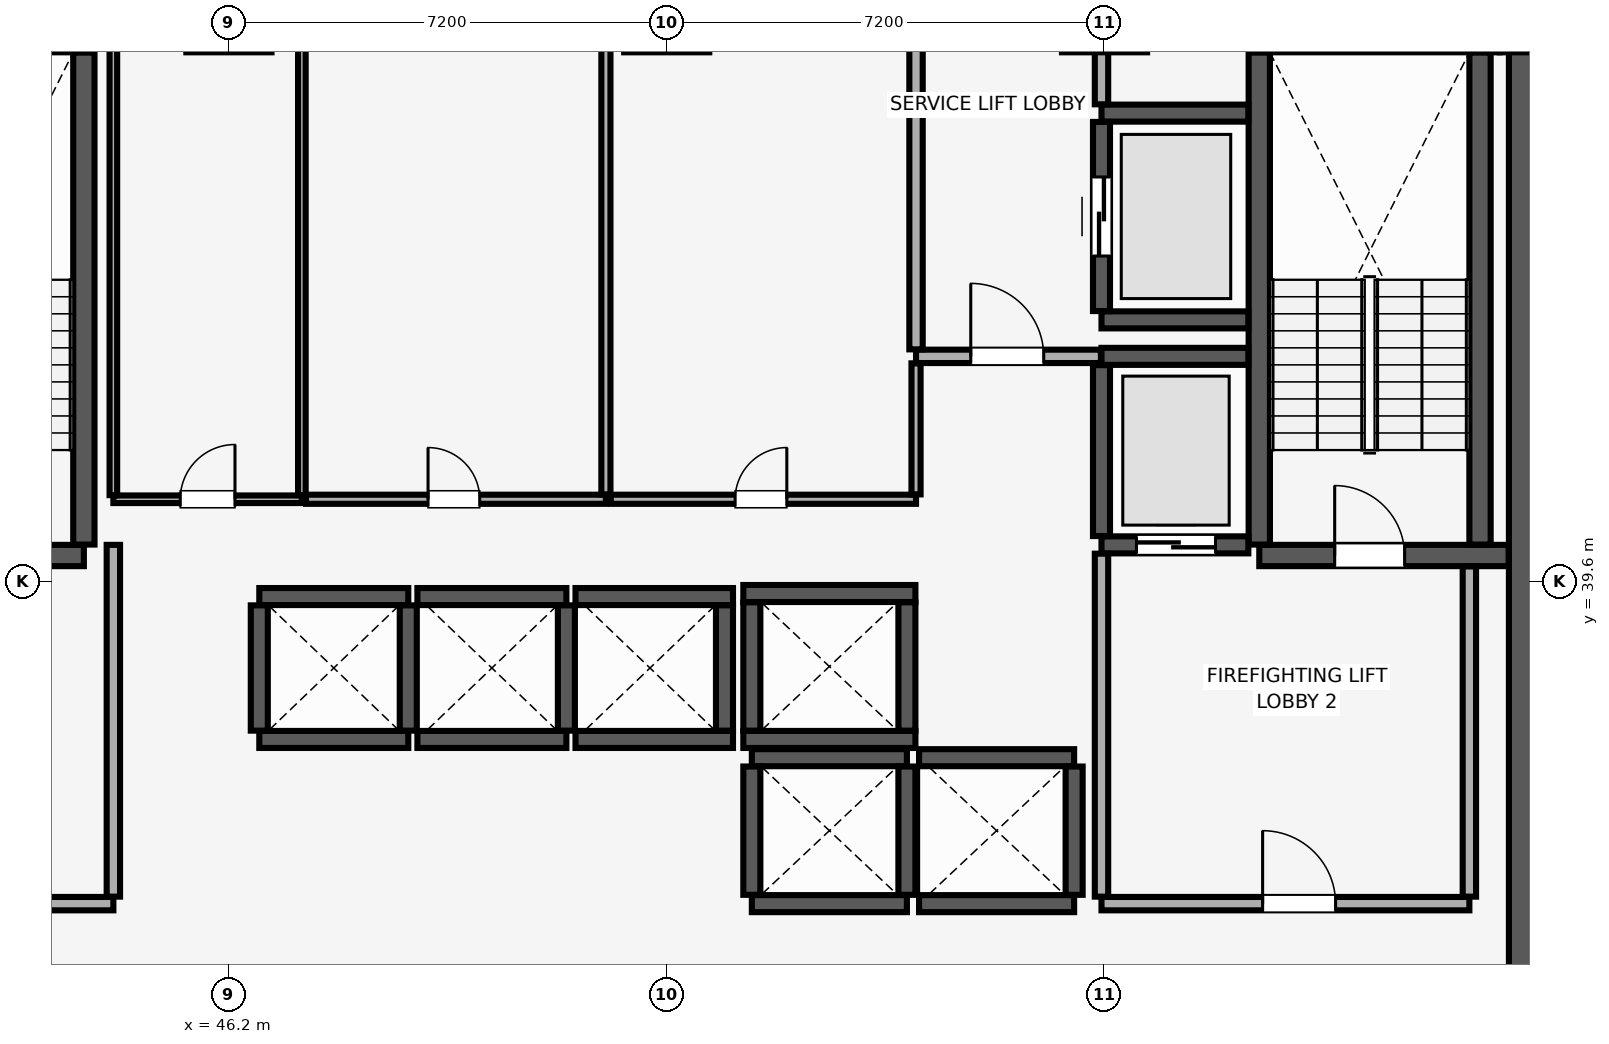
"""IFC4 building model, lengths in metres.
Left out: names, types, materials, properties, quantities, classifications, styles, units other than length and angle.
Written with IfcOpenShell. Run it as: python <this file> out.ifc"""

import sys

from ifc_helpers import new_model, si_unit, direction, frame, frame_2d, origin, place, context, subcontext, project, spatial, rectangle, extrude, element, fill, save


model = new_model("IFC4")
c1 = context("Model", 3, precision=1e-05, world=origin(), true_north=direction((0.0, 1.0)))
c2 = subcontext(c1, "Body", "Model", "MODEL_VIEW")
j1 = project(units=[si_unit("LENGTHUNIT", "METRE"), si_unit("PLANEANGLEUNIT", "RADIAN")], contexts=[c1])
p1 = place(None, origin())
s1 = spatial("IfcSite", under=j1, at=p1, CompositionType="ELEMENT")
p2 = place(p1, origin())
s2 = spatial("IfcBuilding", under=s1, at=p2, CompositionType="ELEMENT")
p3 = place(p2, frame((0.0, 0.0, 31.4)))
s3 = spatial("IfcBuildingStorey", under=s2, at=p3, CompositionType="ELEMENT", Elevation=31.4)
p4 = place(p3, frame((67.8, 29.4, 0.0), z_axis=(0.0, 0.0, 1.0), x_axis=(0.0, 1.0, 0.0)))
e1 = element("IfcWall", 1, at=p4, inside=s3, PredefinedType="SHEAR", context=c2, shape_type="SweptSolid", body=[
    extrude(rectangle(XDim=19.2, YDim=1.1, at=frame_2d((9.6, 0.0))), origin(), (0.0, 0.0, 1.0), 3.51),
])
p5 = place(p3, frame((40.185, 40.025, 0.0), z_axis=(0.0, 0.0, 1.0), x_axis=(1.0, 0.0, 0.0)))
e2 = element("IfcWall", 2, at=p5, inside=s3, PredefinedType="SHEAR", context=c2, shape_type="SweptSolid", body=[
    extrude(rectangle(XDim=3.63, YDim=0.35, at=frame_2d((1.815, 0.0))), origin(), (0.0, 0.0, 1.0), 3.51),
])
p6 = place(p5, frame((1.24, 0.0, 0.0)))
e3 = element("IfcOpeningElement", 3, at=p6, cuts=e2, PredefinedType="OPENING", context=c2, shape_type="SweptSolid", body=[
    extrude(rectangle(XDim=1.15, YDim=2.15, at=frame_2d((0.575, 1.075))), frame((0.0, 0.185, 0.0), z_axis=(0.0, -1.0, 0.0), x_axis=(1.0, 0.0, 0.0)), (0.0, 0.0, 1.0), 0.37),
])
p7 = place(p3, frame((43.815, 40.205, 0.0), z_axis=(0.0, 0.0, 1.0), x_axis=(0.0, 1.0, 0.0)))
e4 = element("IfcWall", 4, at=p7, inside=s3, PredefinedType="SHEAR", context=c2, shape_type="SweptSolid", body=[
    extrude(rectangle(XDim=8.09, YDim=0.35, at=frame_2d((4.045, 0.0))), origin(), (0.0, 0.0, 1.0), 3.51),
])
p8 = place(p3, frame((63.145, 40.025, 0.0), z_axis=(0.0, 0.0, 1.0), x_axis=(1.0, 0.0, 0.0)))
e5 = element("IfcWall", 5, at=p8, inside=s3, PredefinedType="SHEAR", context=c2, shape_type="SweptSolid", body=[
    extrude(rectangle(XDim=4.1, YDim=0.35, at=frame_2d((2.05, 0.0))), origin(), (0.0, 0.0, 1.0), 3.51),
])
p9 = place(p8, frame((1.24, 0.0, 0.0)))
e6 = element("IfcOpeningElement", 6, at=p9, cuts=e5, PredefinedType="OPENING", context=c2, shape_type="SweptSolid", body=[
    extrude(rectangle(XDim=1.15, YDim=2.15, at=frame_2d((0.575, 1.075))), frame((0.0, 0.185, 0.0), z_axis=(0.0, -1.0, 0.0), x_axis=(1.0, 0.0, 0.0)), (0.0, 0.0, 1.0), 0.37),
])
for number, where, z_axis, x_axis in (
    (7, (63.145, 40.205, 0.0), (0.0, 0.0, 1.0), (0.0, 1.0, 0.0)),
    (8, (66.775, 40.205, 0.0), (0.0, 0.0, 1.0), (0.0, 1.0, 0.0)),
):
    element("IfcWall", number, at=place(p3, frame(where, z_axis=z_axis, x_axis=x_axis)), inside=s3, PredefinedType="SHEAR", context=c2, shape_type="SweptSolid", body=[
        extrude(rectangle(XDim=8.09, YDim=0.35, at=frame_2d((4.045, 0.0))), origin(), (0.0, 0.0, 1.0), 3.51),
    ])
for number, where, z_axis, x_axis in (
    (9, (46.7, 37.0, 0.0), (0.0, 0.0, 1.0), (1.0, 0.0, 0.0)),
    (10, (46.7, 39.35, 0.0), (0.0, 0.0, 1.0), (1.0, 0.0, 0.0)),
):
    element("IfcWall", number, at=place(p3, frame(where, z_axis=z_axis, x_axis=x_axis)), inside=s3, PredefinedType="SHEAR", context=c2, shape_type="SweptSolid", body=[
        extrude(rectangle(XDim=2.45, YDim=0.28, at=frame_2d((1.225, 0.0))), origin(), (0.0, 0.0, 1.0), 3.51),
    ])
for number, where, z_axis, x_axis in (
    (11, (46.7, 37.145, 0.0), (0.0, 0.0, 1.0), (0.0, 1.0, 0.0)),
    (12, (49.15, 37.145, 0.0), (0.0, 0.0, 1.0), (0.0, 1.0, 0.0)),
):
    element("IfcWall", number, at=place(p3, frame(where, z_axis=z_axis, x_axis=x_axis)), inside=s3, PredefinedType="SHEAR", context=c2, shape_type="SweptSolid", body=[
        extrude(rectangle(XDim=2.06, YDim=0.28, at=frame_2d((1.03, 0.0))), origin(), (0.0, 0.0, 1.0), 3.51),
    ])
for number, where, z_axis, x_axis in (
    (13, (49.3, 37.0, 0.0), (0.0, 0.0, 1.0), (1.0, 0.0, 0.0)),
    (14, (49.3, 39.35, 0.0), (0.0, 0.0, 1.0), (1.0, 0.0, 0.0)),
):
    element("IfcWall", number, at=place(p3, frame(where, z_axis=z_axis, x_axis=x_axis)), inside=s3, PredefinedType="SHEAR", context=c2, shape_type="SweptSolid", body=[
        extrude(rectangle(XDim=2.45, YDim=0.28, at=frame_2d((1.225, 0.0))), origin(), (0.0, 0.0, 1.0), 3.51),
    ])
p10 = place(p3, frame((51.75, 37.145, 0.0), z_axis=(0.0, 0.0, 1.0), x_axis=(0.0, 1.0, 0.0)))
e15 = element("IfcWall", 15, at=p10, inside=s3, PredefinedType="SHEAR", context=c2, shape_type="SweptSolid", body=[
    extrude(rectangle(XDim=2.06, YDim=0.28, at=frame_2d((1.03, 0.0))), origin(), (0.0, 0.0, 1.0), 3.51),
])
for number, where, z_axis, x_axis in (
    (16, (51.9, 37.0, 0.0), (0.0, 0.0, 1.0), (1.0, 0.0, 0.0)),
    (17, (51.9, 39.35, 0.0), (0.0, 0.0, 1.0), (1.0, 0.0, 0.0)),
):
    element("IfcWall", number, at=place(p3, frame(where, z_axis=z_axis, x_axis=x_axis)), inside=s3, PredefinedType="SHEAR", context=c2, shape_type="SweptSolid", body=[
        extrude(rectangle(XDim=2.59, YDim=0.28, at=frame_2d((1.295, 0.0))), origin(), (0.0, 0.0, 1.0), 3.51),
    ])
p11 = place(p3, frame((54.35, 37.145, 0.0), z_axis=(0.0, 0.0, 1.0), x_axis=(0.0, 1.0, 0.0)))
e18 = element("IfcWall", 18, at=p11, inside=s3, PredefinedType="SHEAR", context=c2, shape_type="SweptSolid", body=[
    extrude(rectangle(XDim=2.06, YDim=0.28, at=frame_2d((1.03, 0.0))), origin(), (0.0, 0.0, 1.0), 3.51),
])
for number, where, z_axis, x_axis in (
    (19, (54.8, 34.3, 0.0), (0.0, 0.0, 1.0), (1.0, 0.0, 0.0)),
    (20, (54.8, 36.7, 0.0), (0.0, 0.0, 1.0), (1.0, 0.0, 0.0)),
):
    element("IfcWall", number, at=place(p3, frame(where, z_axis=z_axis, x_axis=x_axis)), inside=s3, PredefinedType="SHEAR", context=c2, shape_type="SweptSolid", body=[
        extrude(rectangle(XDim=2.55, YDim=0.28, at=frame_2d((1.275, 0.0))), origin(), (0.0, 0.0, 1.0), 3.51),
    ])
for number, where, z_axis, x_axis in (
    (21, (54.8, 34.445, 0.0), (0.0, 0.0, 1.0), (0.0, 1.0, 0.0)),
    (22, (57.35, 34.445, 0.0), (0.0, 0.0, 1.0), (0.0, 1.0, 0.0)),
):
    element("IfcWall", number, at=place(p3, frame(where, z_axis=z_axis, x_axis=x_axis)), inside=s3, PredefinedType="SHEAR", context=c2, shape_type="SweptSolid", body=[
        extrude(rectangle(XDim=2.11, YDim=0.28, at=frame_2d((1.055, 0.0))), origin(), (0.0, 0.0, 1.0), 3.51),
    ])
for number, where, z_axis, x_axis in (
    (23, (57.55, 34.3, 0.0), (0.0, 0.0, 1.0), (1.0, 0.0, 0.0)),
    (24, (57.55, 36.7, 0.0), (0.0, 0.0, 1.0), (1.0, 0.0, 0.0)),
):
    element("IfcWall", number, at=place(p3, frame(where, z_axis=z_axis, x_axis=x_axis)), inside=s3, PredefinedType="SHEAR", context=c2, shape_type="SweptSolid", body=[
        extrude(rectangle(XDim=2.55, YDim=0.28, at=frame_2d((1.275, 0.0))), origin(), (0.0, 0.0, 1.0), 3.51),
    ])
p12 = place(p3, frame((60.1, 34.445, 0.0), z_axis=(0.0, 0.0, 1.0), x_axis=(0.0, 1.0, 0.0)))
e25 = element("IfcWall", 25, at=p12, inside=s3, PredefinedType="SHEAR", context=c2, shape_type="SweptSolid", body=[
    extrude(rectangle(XDim=2.11, YDim=0.28, at=frame_2d((1.055, 0.0))), origin(), (0.0, 0.0, 1.0), 3.51),
])
for number, where, z_axis, x_axis in (
    (26, (54.66, 37.0, 0.0), (0.0, 0.0, 1.0), (1.0, 0.0, 0.0)),
    (27, (54.66, 39.4, 0.0), (0.0, 0.0, 1.0), (1.0, 0.0, 0.0)),
):
    element("IfcWall", number, at=place(p3, frame(where, z_axis=z_axis, x_axis=x_axis)), inside=s3, PredefinedType="SHEAR", context=c2, shape_type="SweptSolid", body=[
        extrude(rectangle(XDim=2.83, YDim=0.28, at=frame_2d((1.415, 0.0))), origin(), (0.0, 0.0, 1.0), 3.51),
    ])
for number, where, z_axis, x_axis in (
    (28, (54.8, 37.145, 0.0), (0.0, 0.0, 1.0), (0.0, 1.0, 0.0)),
    (29, (57.35, 37.145, 0.0), (0.0, 0.0, 1.0), (0.0, 1.0, 0.0)),
):
    element("IfcWall", number, at=place(p3, frame(where, z_axis=z_axis, x_axis=x_axis)), inside=s3, PredefinedType="SHEAR", context=c2, shape_type="SweptSolid", body=[
        extrude(rectangle(XDim=2.11, YDim=0.28, at=frame_2d((1.055, 0.0))), origin(), (0.0, 0.0, 1.0), 3.51),
    ])
p13 = place(p3, frame((60.55, 40.2, 0.0), z_axis=(0.0, 0.0, 1.0), x_axis=(1.0, 0.0, 0.0)))
e30 = element("IfcWall", 30, at=p13, inside=s3, PredefinedType="SHEAR", context=c2, shape_type="SweptSolid", body=[
    extrude(rectangle(XDim=2.415, YDim=0.28, at=frame_2d((1.208, 0.0))), origin(), (0.0, 0.0, 1.0), 3.51),
])
p14 = place(p13, frame((0.575, 0.0, 0.0)))
e31 = element("IfcOpeningElement", 31, at=p14, cuts=e30, PredefinedType="OPENING", context=c2, shape_type="SweptSolid", body=[
    extrude(rectangle(XDim=1.3, YDim=2.3, at=frame_2d((0.65, 1.15))), frame((0.0, 0.15, 0.0), z_axis=(0.0, -1.0, 0.0), x_axis=(1.0, 0.0, 0.0)), (0.0, 0.0, 1.0), 0.3),
])
p15 = place(p3, frame((60.55, 43.3, 0.0), z_axis=(0.0, 0.0, 1.0), x_axis=(1.0, 0.0, 0.0)))
e32 = element("IfcWall", 32, at=p15, inside=s3, PredefinedType="SHEAR", context=c2, shape_type="SweptSolid", body=[
    extrude(rectangle(XDim=2.415, YDim=0.28, at=frame_2d((1.208, 0.0))), origin(), (0.0, 0.0, 1.0), 3.51),
])
p16 = place(p3, frame((60.55, 40.345, 0.0), z_axis=(0.0, 0.0, 1.0), x_axis=(0.0, 1.0, 0.0)))
e33 = element("IfcWall", 33, at=p16, inside=s3, PredefinedType="SHEAR", context=c2, shape_type="SweptSolid", body=[
    extrude(rectangle(XDim=2.81, YDim=0.28, at=frame_2d((1.405, 0.0))), origin(), (0.0, 0.0, 1.0), 3.51),
])
for number, where, z_axis, x_axis in (
    (34, (60.55, 43.9, 0.0), (0.0, 0.0, 1.0), (1.0, 0.0, 0.0)),
    (35, (60.55, 47.3, 0.0), (0.0, 0.0, 1.0), (1.0, 0.0, 0.0)),
):
    element("IfcWall", number, at=place(p3, frame(where, z_axis=z_axis, x_axis=x_axis)), inside=s3, PredefinedType="SHEAR", context=c2, shape_type="SweptSolid", body=[
        extrude(rectangle(XDim=2.415, YDim=0.28, at=frame_2d((1.208, 0.0))), origin(), (0.0, 0.0, 1.0), 3.51),
    ])
p17 = place(p3, frame((60.55, 44.045, 0.0), z_axis=(0.0, 0.0, 1.0), x_axis=(0.0, 1.0, 0.0)))
e36 = element("IfcWall", 36, at=p17, inside=s3, PredefinedType="SHEAR", context=c2, shape_type="SweptSolid", body=[
    extrude(rectangle(XDim=3.11, YDim=0.28, at=frame_2d((1.555, 0.0))), origin(), (0.0, 0.0, 1.0), 3.51),
])
p18 = place(p17, frame((0.905, 0.0, 0.0)))
e37 = element("IfcOpeningElement", 37, at=p18, cuts=e36, PredefinedType="OPENING", context=c2, shape_type="SweptSolid", body=[
    extrude(rectangle(XDim=1.3, YDim=2.3, at=frame_2d((0.65, 1.15))), frame((0.0, 0.15, 0.0), z_axis=(0.0, -1.0, 0.0), x_axis=(1.0, 0.0, 0.0)), (0.0, 0.0, 1.0), 0.3),
])
p19 = place(p3, frame((60.55, 34.3, 0.0), z_axis=(0.0, 0.0, 1.0), x_axis=(1.0, 0.0, 0.0)))
e38 = element("IfcWall", 38, at=p19, inside=s3, PredefinedType="PARTITIONING", context=c2, shape_type="SweptSolid", body=[
    extrude(rectangle(XDim=6.05, YDim=0.22, at=frame_2d((3.025, 0.0))), origin(), (0.0, 0.0, 1.0), 3.51),
])
p20 = place(p19, frame((2.65, 0.0, 0.0)))
e39 = element("IfcOpeningElement", 39, at=p20, cuts=e38, PredefinedType="OPENING", context=c2, shape_type="SweptSolid", body=[
    extrude(rectangle(XDim=1.2, YDim=2.15, at=frame_2d((0.6, 1.075))), frame((0.0, 0.12, 0.0), z_axis=(0.0, -1.0, 0.0), x_axis=(1.0, 0.0, 0.0)), (0.0, 0.0, 1.0), 0.24),
])
p21 = place(p3, frame((60.55, 34.415, 0.0), z_axis=(0.0, 0.0, 1.0), x_axis=(0.0, 1.0, 0.0)))
e40 = element("IfcWall", 40, at=p21, inside=s3, PredefinedType="PARTITIONING", context=c2, shape_type="SweptSolid", body=[
    extrude(rectangle(XDim=5.64, YDim=0.22, at=frame_2d((2.82, 0.0))), origin(), (0.0, 0.0, 1.0), 3.51),
])
p22 = place(p3, frame((66.6, 34.415, 0.0), z_axis=(0.0, 0.0, 1.0), x_axis=(0.0, 1.0, 0.0)))
e41 = element("IfcWall", 41, at=p22, inside=s3, PredefinedType="PARTITIONING", context=c2, shape_type="SweptSolid", body=[
    extrude(rectangle(XDim=5.43, YDim=0.22, at=frame_2d((2.715, 0.0))), origin(), (0.0, 0.0, 1.0), 3.51),
])
p23 = place(p3, frame((39.7, 34.3, 0.0), z_axis=(0.0, 0.0, 1.0), x_axis=(1.0, 0.0, 0.0)))
e42 = element("IfcWall", 42, at=p23, inside=s3, PredefinedType="PARTITIONING", context=c2, shape_type="SweptSolid", body=[
    extrude(rectangle(XDim=4.6, YDim=0.22, at=frame_2d((2.3, 0.0))), origin(), (0.0, 0.0, 1.0), 3.51),
])
p24 = place(p23, frame((1.7, 0.0, 0.0)))
e43 = element("IfcOpeningElement", 43, at=p24, cuts=e42, PredefinedType="OPENING", context=c2, shape_type="SweptSolid", body=[
    extrude(rectangle(XDim=1.2, YDim=2.15, at=frame_2d((0.6, 1.075))), frame((0.0, 0.12, 0.0), z_axis=(0.0, -1.0, 0.0), x_axis=(1.0, 0.0, 0.0)), (0.0, 0.0, 1.0), 0.24),
])
p25 = place(p3, frame((44.3, 34.415, 0.0), z_axis=(0.0, 0.0, 1.0), x_axis=(0.0, 1.0, 0.0)))
e44 = element("IfcWall", 44, at=p25, inside=s3, PredefinedType="PARTITIONING", context=c2, shape_type="SweptSolid", body=[
    extrude(rectangle(XDim=5.785, YDim=0.22, at=frame_2d((2.893, 0.0))), origin(), (0.0, 0.0, 1.0), 3.51),
])
p26 = place(p3, frame((57.5, 43.3, 0.0), z_axis=(0.0, 0.0, 1.0), x_axis=(1.0, 0.0, 0.0)))
e45 = element("IfcWall", 45, at=p26, inside=s3, PredefinedType="PARTITIONING", context=c2, shape_type="SweptSolid", body=[
    extrude(rectangle(XDim=3.04, YDim=0.22, at=frame_2d((1.52, 0.0))), origin(), (0.0, 0.0, 1.0), 3.51),
])
p27 = place(p26, frame((0.9, 0.0, 0.0)))
e46 = element("IfcOpeningElement", 46, at=p27, cuts=e45, PredefinedType="OPENING", context=c2, shape_type="SweptSolid", body=[
    extrude(rectangle(XDim=1.2, YDim=2.15, at=frame_2d((0.6, 1.075))), frame((0.0, 0.12, 0.0), z_axis=(0.0, -1.0, 0.0), x_axis=(1.0, 0.0, 0.0)), (0.0, 0.0, 1.0), 0.24),
])
p28 = place(p3, frame((57.5, 43.415, 0.0), z_axis=(0.0, 0.0, 1.0), x_axis=(0.0, 1.0, 0.0)))
e47 = element("IfcWall", 47, at=p28, inside=s3, PredefinedType="PARTITIONING", context=c2, shape_type="SweptSolid", body=[
    extrude(rectangle(XDim=5.435, YDim=0.22, at=frame_2d((2.718, 0.0))), origin(), (0.0, 0.0, 1.0), 3.51),
])
p29 = place(p3, frame((60.55, 47.445, 0.0), z_axis=(0.0, 0.0, 1.0), x_axis=(0.0, 1.0, 0.0)))
e48 = element("IfcWall", 48, at=p29, inside=s3, PredefinedType="PARTITIONING", context=c2, shape_type="SweptSolid", body=[
    extrude(rectangle(XDim=1.405, YDim=0.22, at=frame_2d((0.703, 0.0))), origin(), (0.0, 0.0, 1.0), 3.51),
])
p30 = place(p3, frame((44.3, 40.95, 0.0), z_axis=(0.0, 0.0, 1.0), x_axis=(1.0, 0.0, 0.0)))
e49 = element("IfcWall", 49, at=p30, inside=s3, PredefinedType="PARTITIONING", context=c2, shape_type="SweptSolid", body=[
    extrude(rectangle(XDim=3.1, YDim=0.125, at=frame_2d((1.55, 0.0))), origin(), (0.0, 0.0, 1.0), 3.51),
])
p31 = place(p30, frame((1.1, 0.0, 0.0)))
e50 = element("IfcOpeningElement", 50, at=p31, cuts=e49, PredefinedType="OPENING", context=c2, shape_type="SweptSolid", body=[
    extrude(rectangle(XDim=0.9, YDim=2.1, at=frame_2d((0.45, 1.05))), frame((0.0, 0.073, 0.0), z_axis=(0.0, -1.0, 0.0), x_axis=(1.0, 0.0, 0.0)), (0.0, 0.0, 1.0), 0.145),
])
for number, where, z_axis, x_axis in (
    (51, (44.3, 41.018, 0.0), (0.0, 0.0, 1.0), (0.0, 1.0, 0.0)),
    (52, (47.4, 41.018, 0.0), (0.0, 0.0, 1.0), (0.0, 1.0, 0.0)),
):
    element("IfcWall", number, at=place(p3, frame(where, z_axis=z_axis, x_axis=x_axis)), inside=s3, PredefinedType="PARTITIONING", context=c2, shape_type="SweptSolid", body=[
        extrude(rectangle(XDim=7.833, YDim=0.125, at=frame_2d((3.916, 0.0))), origin(), (0.0, 0.0, 1.0), 3.51),
    ])
p32 = place(p3, frame((47.468, 40.95, 0.0), z_axis=(0.0, 0.0, 1.0), x_axis=(1.0, 0.0, 0.0)))
e53 = element("IfcWall", 53, at=p32, inside=s3, PredefinedType="PARTITIONING", context=c2, shape_type="SweptSolid", body=[
    extrude(rectangle(XDim=4.932, YDim=0.15, at=frame_2d((2.466, 0.0))), origin(), (0.0, 0.0, 1.0), 3.51),
])
p33 = place(p32, frame((2.008, 0.0, 0.0)))
e54 = element("IfcOpeningElement", 54, at=p33, cuts=e53, PredefinedType="OPENING", context=c2, shape_type="SweptSolid", body=[
    extrude(rectangle(XDim=0.85, YDim=2.1, at=frame_2d((0.425, 1.05))), frame((0.0, 0.085, 0.0), z_axis=(0.0, -1.0, 0.0), x_axis=(1.0, 0.0, 0.0)), (0.0, 0.0, 1.0), 0.17),
])
p34 = place(p3, frame((52.4, 41.03, 0.0), z_axis=(0.0, 0.0, 1.0), x_axis=(0.0, 1.0, 0.0)))
e55 = element("IfcWall", 55, at=p34, inside=s3, PredefinedType="PARTITIONING", context=c2, shape_type="SweptSolid", body=[
    extrude(rectangle(XDim=7.82, YDim=0.15, at=frame_2d((3.91, 0.0))), origin(), (0.0, 0.0, 1.0), 3.51),
])
p35 = place(p3, frame((52.48, 40.95, 0.0), z_axis=(0.0, 0.0, 1.0), x_axis=(1.0, 0.0, 0.0)))
e56 = element("IfcWall", 56, at=p35, inside=s3, PredefinedType="PARTITIONING", context=c2, shape_type="SweptSolid", body=[
    extrude(rectangle(XDim=5.02, YDim=0.15, at=frame_2d((2.51, 0.0))), origin(), (0.0, 0.0, 1.0), 3.51),
])
p36 = place(p35, frame((2.045, 0.0, 0.0)))
e57 = element("IfcOpeningElement", 57, at=p36, cuts=e56, PredefinedType="OPENING", context=c2, shape_type="SweptSolid", body=[
    extrude(rectangle(XDim=0.85, YDim=2.1, at=frame_2d((0.425, 1.05))), frame((0.0, 0.085, 0.0), z_axis=(0.0, -1.0, 0.0), x_axis=(1.0, 0.0, 0.0)), (0.0, 0.0, 1.0), 0.17),
])
p37 = place(p3, frame((57.5, 41.03, 0.0), z_axis=(0.0, 0.0, 1.0), x_axis=(0.0, 1.0, 0.0)))
e58 = element("IfcWall", 58, at=p37, inside=s3, PredefinedType="PARTITIONING", context=c2, shape_type="SweptSolid", body=[
    extrude(rectangle(XDim=2.155, YDim=0.15, at=frame_2d((1.078, 0.0))), origin(), (0.0, 0.0, 1.0), 3.51),
])
p38 = place(p9, origin())
e59 = element("IfcDoor", 59, at=p38, inside=s3, OperationType="SINGLE_SWING_LEFT", PredefinedType="DOOR", context=c2, shape_type="SweptSolid", body=[
    extrude(rectangle(XDim=1.15, YDim=2.15, at=frame_2d((0.575, 1.075))), frame((0.0, 0.025, 0.0), z_axis=(0.0, -1.0, 0.0), x_axis=(1.0, 0.0, 0.0)), (0.0, 0.0, 1.0), 0.05),
])
fill(e6, e59)
p39 = place(p14, origin())
e60 = element("IfcDoor", 60, at=p39, inside=s3, OperationType="DOUBLE_DOOR_SLIDING", PredefinedType="DOOR", context=c2, shape_type="SweptSolid", body=[
    extrude(rectangle(XDim=1.3, YDim=2.3, at=frame_2d((0.65, 1.15))), frame((0.0, 0.025, 0.0), z_axis=(0.0, -1.0, 0.0), x_axis=(1.0, 0.0, 0.0)), (0.0, 0.0, 1.0), 0.05),
])
fill(e31, e60)
p40 = place(p18, origin())
e61 = element("IfcDoor", 61, at=p40, inside=s3, OperationType="DOUBLE_DOOR_SLIDING", PredefinedType="DOOR", context=c2, shape_type="SweptSolid", body=[
    extrude(rectangle(XDim=1.3, YDim=2.3, at=frame_2d((0.65, 1.15))), frame((0.0, 0.025, 0.0), z_axis=(0.0, -1.0, 0.0), x_axis=(1.0, 0.0, 0.0)), (0.0, 0.0, 1.0), 0.05),
])
fill(e37, e61)
p41 = place(p20, origin())
e62 = element("IfcDoor", 62, at=p41, inside=s3, OperationType="SINGLE_SWING_LEFT", PredefinedType="DOOR", context=c2, shape_type="SweptSolid", body=[
    extrude(rectangle(XDim=1.2, YDim=2.15, at=frame_2d((0.6, 1.075))), frame((0.0, 0.025, 0.0), z_axis=(0.0, -1.0, 0.0), x_axis=(1.0, 0.0, 0.0)), (0.0, 0.0, 1.0), 0.05),
])
fill(e39, e62)
p42 = place(p27, origin())
e63 = element("IfcDoor", 63, at=p42, inside=s3, OperationType="SINGLE_SWING_LEFT", PredefinedType="DOOR", context=c2, shape_type="SweptSolid", body=[
    extrude(rectangle(XDim=1.2, YDim=2.15, at=frame_2d((0.6, 1.075))), frame((0.0, 0.025, 0.0), z_axis=(0.0, -1.0, 0.0), x_axis=(1.0, 0.0, 0.0)), (0.0, 0.0, 1.0), 0.05),
])
fill(e46, e63)
p43 = place(p31, origin())
e64 = element("IfcDoor", 64, at=p43, inside=s3, OperationType="SINGLE_SWING_RIGHT", PredefinedType="DOOR", context=c2, shape_type="SweptSolid", body=[
    extrude(rectangle(XDim=0.9, YDim=2.1, at=frame_2d((0.45, 1.05))), frame((0.0, 0.025, 0.0), z_axis=(0.0, -1.0, 0.0), x_axis=(1.0, 0.0, 0.0)), (0.0, 0.0, 1.0), 0.05),
])
fill(e50, e64)
p44 = place(p33, origin())
e65 = element("IfcDoor", 65, at=p44, inside=s3, OperationType="SINGLE_SWING_LEFT", PredefinedType="DOOR", context=c2, shape_type="SweptSolid", body=[
    extrude(rectangle(XDim=0.85, YDim=2.1, at=frame_2d((0.425, 1.05))), frame((0.0, 0.025, 0.0), z_axis=(0.0, -1.0, 0.0), x_axis=(1.0, 0.0, 0.0)), (0.0, 0.0, 1.0), 0.05),
])
fill(e54, e65)
p45 = place(p36, origin())
e66 = element("IfcDoor", 66, at=p45, inside=s3, OperationType="SINGLE_SWING_RIGHT", PredefinedType="DOOR", context=c2, shape_type="SweptSolid", body=[
    extrude(rectangle(XDim=0.85, YDim=2.1, at=frame_2d((0.425, 1.05))), frame((0.0, 0.025, 0.0), z_axis=(0.0, -1.0, 0.0), x_axis=(1.0, 0.0, 0.0)), (0.0, 0.0, 1.0), 0.05),
])
fill(e57, e66)
save(model, sys.argv[1])
